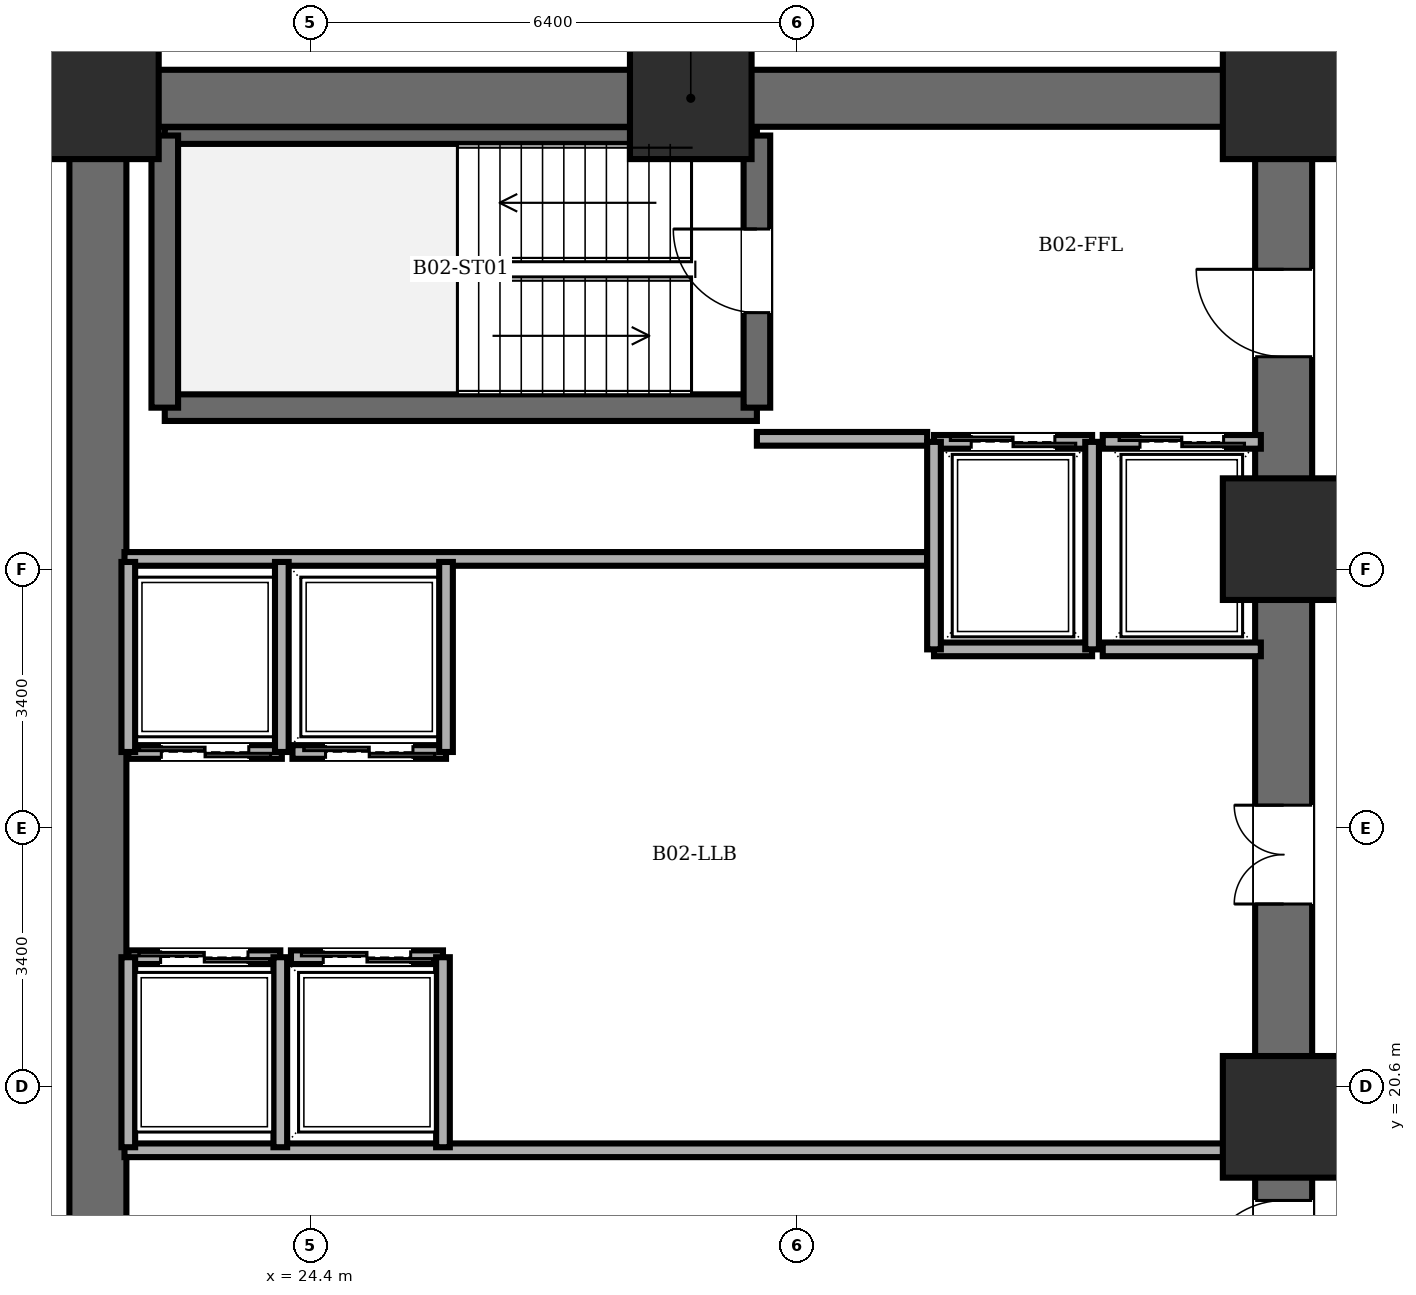
"""IFC4 building model, lengths in metres.
Left out: names, types, materials, properties, quantities, classifications, styles, units other than length and angle.
Written with IfcOpenShell. Run it as: python <this file> out.ifc"""

import sys

from ifc_helpers import new_model, si_unit, direction, frame, frame_2d, origin, origin_2d, place, context, subcontext, project, spatial, rectangle, extrude, element, fill, save


model = new_model("IFC4")
c1 = context("Model", 3, precision=1e-05, world=origin(), true_north=direction((0.0, 1.0)))
c2 = subcontext(c1, "Body", "Model", "MODEL_VIEW")
j1 = project(units=[si_unit("LENGTHUNIT", "METRE"), si_unit("PLANEANGLEUNIT", "RADIAN")], contexts=[c1])
p1 = place(None, origin())
s1 = spatial("IfcSite", under=j1, at=p1, CompositionType="ELEMENT")
p2 = place(p1, origin())
s2 = spatial("IfcBuilding", under=s1, at=p2, CompositionType="ELEMENT")
p3 = place(p2, frame((0.0, 0.0, -8.4)))
s3 = spatial("IfcBuildingStorey", under=s2, at=p3, CompositionType="ELEMENT", Elevation=-8.4)
for number, where, z_axis, x_axis in (
    (1, (37.2, 20.2, 0.0), (0.0, 0.0, 1.0), (1.0, 0.0, 0.0)),
    (2, (37.2, 27.8, 0.0), (0.0, 0.0, 1.0), (1.0, 0.0, 0.0)),
    (3, (37.2, 33.6, 0.0), (0.0, 0.0, 1.0), (1.0, 0.0, 0.0)),
    (4, (29.4, 33.6, 0.0), (0.0, 0.0, 1.0), (1.0, 0.0, 0.0)),
    (5, (21.6, 33.6, 0.0), (0.0, 0.0, 1.0), (1.0, 0.0, 0.0)),
):
    element("IfcColumn", number, at=place(p3, frame(where, z_axis=z_axis, x_axis=x_axis)), inside=s3, PredefinedType="COLUMN", context=c2, shape_type="SweptSolid", body=[
        extrude(rectangle(XDim=1.6, YDim=1.6, at=origin_2d()), origin(), (0.0, 0.0, 1.0), 4.2),
    ])
p4 = place(p3, frame((21.6, 14.4, 0.0), z_axis=(0.0, 0.0, 1.0), x_axis=(0.0, 1.0, 0.0)))
e6 = element("IfcWall", 6, at=p4, inside=s3, PredefinedType="SHEAR", context=c2, shape_type="SweptSolid", body=[
    extrude(rectangle(XDim=19.2, YDim=0.75, at=frame_2d((9.6, 0.0))), origin(), (0.0, 0.0, 1.0), 3.95),
])
p5 = place(p3, frame((21.6, 33.6, 0.0), z_axis=(0.0, 0.0, 1.0), x_axis=(1.0, 0.0, 0.0)))
e7 = element("IfcWall", 7, at=p5, inside=s3, PredefinedType="SHEAR", context=c2, shape_type="SweptSolid", body=[
    extrude(rectangle(XDim=15.6, YDim=0.75, at=frame_2d((7.8, 0.0))), origin(), (0.0, 0.0, 1.0), 3.95),
])
p6 = place(p3, frame((37.2, 14.4, 0.0), z_axis=(0.0, 0.0, 1.0), x_axis=(0.0, 1.0, 0.0)))
e8 = element("IfcWall", 8, at=p6, inside=s3, PredefinedType="SHEAR", context=c2, shape_type="SweptSolid", body=[
    extrude(rectangle(XDim=19.2, YDim=0.75, at=frame_2d((9.6, 0.0))), origin(), (0.0, 0.0, 1.0), 3.95),
])
p7 = place(p6, frame((15.8, 0.0, 0.0)))
e9 = element("IfcOpeningElement", 9, at=p7, cuts=e8, PredefinedType="OPENING", context=c2, shape_type="SweptSolid", body=[
    extrude(rectangle(XDim=1.15, YDim=2.15, at=frame_2d((0.575, 1.075))), frame((0.0, 0.385, 0.0), z_axis=(0.0, -1.0, 0.0), x_axis=(1.0, 0.0, 0.0)), (0.0, 0.0, 1.0), 0.77),
])
p8 = place(p6, frame((3.6, 0.0, 0.0)))
e10 = element("IfcOpeningElement", 10, at=p8, cuts=e8, PredefinedType="OPENING", context=c2, shape_type="SweptSolid", body=[
    extrude(rectangle(XDim=1.1, YDim=2.15, at=frame_2d((0.55, 1.075))), frame((0.0, 0.385, 0.0), z_axis=(0.0, -1.0, 0.0), x_axis=(1.0, 0.0, 0.0)), (0.0, 0.0, 1.0), 0.77),
])
p9 = place(p6, frame((8.6, 0.0, 0.0)))
e11 = element("IfcOpeningElement", 11, at=p9, cuts=e8, PredefinedType="OPENING", context=c2, shape_type="SweptSolid", body=[
    extrude(rectangle(XDim=1.3, YDim=2.2, at=frame_2d((0.65, 1.1))), frame((0.0, 0.385, 0.0), z_axis=(0.0, -1.0, 0.0), x_axis=(1.0, 0.0, 0.0)), (0.0, 0.0, 1.0), 0.77),
])
p10 = place(p3, frame((22.48, 29.53, 0.0), z_axis=(0.0, 0.0, 1.0), x_axis=(1.0, 0.0, 0.0)))
e12 = element("IfcWall", 12, at=p10, inside=s3, PredefinedType="SOLIDWALL", context=c2, shape_type="SweptSolid", body=[
    extrude(rectangle(XDim=7.79, YDim=0.35, at=frame_2d((3.895, 0.0))), origin(), (0.0, 0.0, 1.0), 3.95),
])
p11 = place(p3, frame((22.48, 33.11, 0.0), z_axis=(0.0, 0.0, 1.0), x_axis=(1.0, 0.0, 0.0)))
e13 = element("IfcWall", 13, at=p11, inside=s3, PredefinedType="PARTITIONING", context=c2, shape_type="SweptSolid", body=[
    extrude(rectangle(XDim=7.79, YDim=0.22, at=frame_2d((3.895, 0.0))), origin(), (0.0, 0.0, 1.0), 3.95),
])
p12 = place(p3, frame((22.48, 29.53, 0.0), z_axis=(0.0, 0.0, 1.0), x_axis=(0.0, 1.0, 0.0)))
e14 = element("IfcWall", 14, at=p12, inside=s3, PredefinedType="SOLIDWALL", context=c2, shape_type="SweptSolid", body=[
    extrude(rectangle(XDim=3.58, YDim=0.35, at=frame_2d((1.79, 0.0))), origin(), (0.0, 0.0, 1.0), 3.95),
])
p13 = place(p3, frame((30.27, 29.53, 0.0), z_axis=(0.0, 0.0, 1.0), x_axis=(0.0, 1.0, 0.0)))
e15 = element("IfcWall", 15, at=p13, inside=s3, PredefinedType="SOLIDWALL", context=c2, shape_type="SweptSolid", body=[
    extrude(rectangle(XDim=3.58, YDim=0.35, at=frame_2d((1.79, 0.0))), origin(), (0.0, 0.0, 1.0), 3.95),
])
p14 = place(p13, frame((1.25, 0.0, 0.0)))
e16 = element("IfcOpeningElement", 16, at=p14, cuts=e15, PredefinedType="OPENING", context=c2, shape_type="SweptSolid", body=[
    extrude(rectangle(XDim=1.1, YDim=2.15, at=frame_2d((0.55, 1.075))), frame((0.0, 0.185, 0.0), z_axis=(0.0, -1.0, 0.0), x_axis=(1.0, 0.0, 0.0)), (0.0, 0.0, 1.0), 0.37),
])
p15 = place(p3, frame((30.27, 29.12, 0.0), z_axis=(0.0, 0.0, 1.0), x_axis=(1.0, 0.0, 0.0)))
e17 = element("IfcWall", 17, at=p15, inside=s3, PredefinedType="PARTITIONING", context=c2, shape_type="SweptSolid", body=[
    extrude(rectangle(XDim=2.24, YDim=0.18, at=frame_2d((1.12, 0.0))), origin(), (0.0, 0.0, 1.0), 3.95),
])
p16 = place(p3, frame((21.95, 27.54, 0.0), z_axis=(0.0, 0.0, 1.0), x_axis=(1.0, 0.0, 0.0)))
e18 = element("IfcWall", 18, at=p16, inside=s3, PredefinedType="PARTITIONING", context=c2, shape_type="SweptSolid", body=[
    extrude(rectangle(XDim=10.56, YDim=0.18, at=frame_2d((5.28, 0.0))), origin(), (0.0, 0.0, 1.0), 3.95),
])
p17 = place(p3, frame((21.95, 19.76, 0.0), z_axis=(0.0, 0.0, 1.0), x_axis=(1.0, 0.0, 0.0)))
e19 = element("IfcWall", 19, at=p17, inside=s3, PredefinedType="PARTITIONING", context=c2, shape_type="SweptSolid", body=[
    extrude(rectangle(XDim=14.87, YDim=0.18, at=frame_2d((7.435, 0.0))), origin(), (0.0, 0.0, 1.0), 3.95),
])
p18 = place(p3, frame((32.6, 29.08, 0.0), z_axis=(0.0, 0.0, 1.0), x_axis=(1.0, 0.0, 0.0)))
e20 = element("IfcWall", 20, at=p18, inside=s3, PredefinedType="PARTITIONING", context=c2, shape_type="SweptSolid", body=[
    extrude(rectangle(XDim=2.08, YDim=0.18, at=frame_2d((1.04, 0.0))), origin(), (0.0, 0.0, 1.0), 3.95),
])
p19 = place(p18, frame((0.49, 0.0, 0.0)))
e21 = element("IfcOpeningElement", 21, at=p19, cuts=e20, PredefinedType="OPENING", context=c2, shape_type="SweptSolid", body=[
    extrude(rectangle(XDim=1.1, YDim=2.2, at=frame_2d((0.55, 1.1))), frame((0.0, 0.1, 0.0), z_axis=(0.0, -1.0, 0.0), x_axis=(1.0, 0.0, 0.0)), (0.0, 0.0, 1.0), 0.2),
])
p20 = place(p3, frame((34.68, 26.35, 0.0), z_axis=(0.0, 0.0, 1.0), x_axis=(-1.0, 0.0, 0.0)))
e22 = element("IfcWall", 22, at=p20, inside=s3, PredefinedType="PARTITIONING", context=c2, shape_type="SweptSolid", body=[
    extrude(rectangle(XDim=2.08, YDim=0.18, at=frame_2d((1.04, 0.0))), origin(), (0.0, 0.0, 1.0), 3.95),
])
for number, where, z_axis, x_axis in (
    (23, (34.68, 26.35, 0.0), (0.0, 0.0, 1.0), (0.0, 1.0, 0.0)),
    (24, (32.6, 29.08, 0.0), (0.0, 0.0, 1.0), (0.0, -1.0, 0.0)),
):
    element("IfcWall", number, at=place(p3, frame(where, z_axis=z_axis, x_axis=x_axis)), inside=s3, PredefinedType="PARTITIONING", context=c2, shape_type="SweptSolid", body=[
        extrude(rectangle(XDim=2.73, YDim=0.18, at=frame_2d((1.365, 0.0))), origin(), (0.0, 0.0, 1.0), 3.95),
    ])
p21 = place(p3, frame((34.82, 29.08, 0.0), z_axis=(0.0, 0.0, 1.0), x_axis=(1.0, 0.0, 0.0)))
e25 = element("IfcWall", 25, at=p21, inside=s3, PredefinedType="PARTITIONING", context=c2, shape_type="SweptSolid", body=[
    extrude(rectangle(XDim=2.08, YDim=0.18, at=frame_2d((1.04, 0.0))), origin(), (0.0, 0.0, 1.0), 3.95),
])
p22 = place(p21, frame((0.49, 0.0, 0.0)))
e26 = element("IfcOpeningElement", 26, at=p22, cuts=e25, PredefinedType="OPENING", context=c2, shape_type="SweptSolid", body=[
    extrude(rectangle(XDim=1.1, YDim=2.2, at=frame_2d((0.55, 1.1))), frame((0.0, 0.1, 0.0), z_axis=(0.0, -1.0, 0.0), x_axis=(1.0, 0.0, 0.0)), (0.0, 0.0, 1.0), 0.2),
])
p23 = place(p3, frame((36.9, 26.35, 0.0), z_axis=(0.0, 0.0, 1.0), x_axis=(-1.0, 0.0, 0.0)))
e27 = element("IfcWall", 27, at=p23, inside=s3, PredefinedType="PARTITIONING", context=c2, shape_type="SweptSolid", body=[
    extrude(rectangle(XDim=2.08, YDim=0.18, at=frame_2d((1.04, 0.0))), origin(), (0.0, 0.0, 1.0), 3.95),
])
p24 = place(p3, frame((24.02, 25.0, 0.0), z_axis=(0.0, 0.0, 1.0), x_axis=(-1.0, 0.0, 0.0)))
e28 = element("IfcWall", 28, at=p24, inside=s3, PredefinedType="PARTITIONING", context=c2, shape_type="SweptSolid", body=[
    extrude(rectangle(XDim=2.02, YDim=0.18, at=frame_2d((1.01, 0.0))), origin(), (0.0, 0.0, 1.0), 3.95),
])
p25 = place(p24, frame((0.435, 0.0, 0.0)))
e29 = element("IfcOpeningElement", 29, at=p25, cuts=e28, PredefinedType="OPENING", context=c2, shape_type="SweptSolid", body=[
    extrude(rectangle(XDim=1.15, YDim=2.2, at=frame_2d((0.575, 1.1))), frame((0.0, 0.1, 0.0), z_axis=(0.0, -1.0, 0.0), x_axis=(1.0, 0.0, 0.0)), (0.0, 0.0, 1.0), 0.2),
])
for number, where, z_axis, x_axis in (
    (30, (24.02, 25.0, 0.0), (0.0, 0.0, 1.0), (0.0, 1.0, 0.0)),
    (31, (22.0, 27.5, 0.0), (0.0, 0.0, 1.0), (0.0, -1.0, 0.0)),
):
    element("IfcWall", number, at=place(p3, frame(where, z_axis=z_axis, x_axis=x_axis)), inside=s3, PredefinedType="PARTITIONING", context=c2, shape_type="SweptSolid", body=[
        extrude(rectangle(XDim=2.5, YDim=0.18, at=frame_2d((1.25, 0.0))), origin(), (0.0, 0.0, 1.0), 3.95),
    ])
p26 = place(p3, frame((26.18, 25.0, 0.0), z_axis=(0.0, 0.0, 1.0), x_axis=(-1.0, 0.0, 0.0)))
e32 = element("IfcWall", 32, at=p26, inside=s3, PredefinedType="PARTITIONING", context=c2, shape_type="SweptSolid", body=[
    extrude(rectangle(XDim=2.02, YDim=0.18, at=frame_2d((1.01, 0.0))), origin(), (0.0, 0.0, 1.0), 3.95),
])
p27 = place(p26, frame((0.435, 0.0, 0.0)))
e33 = element("IfcOpeningElement", 33, at=p27, cuts=e32, PredefinedType="OPENING", context=c2, shape_type="SweptSolid", body=[
    extrude(rectangle(XDim=1.15, YDim=2.2, at=frame_2d((0.575, 1.1))), frame((0.0, 0.1, 0.0), z_axis=(0.0, -1.0, 0.0), x_axis=(1.0, 0.0, 0.0)), (0.0, 0.0, 1.0), 0.2),
])
p28 = place(p3, frame((26.18, 25.0, 0.0), z_axis=(0.0, 0.0, 1.0), x_axis=(0.0, 1.0, 0.0)))
e34 = element("IfcWall", 34, at=p28, inside=s3, PredefinedType="PARTITIONING", context=c2, shape_type="SweptSolid", body=[
    extrude(rectangle(XDim=2.5, YDim=0.18, at=frame_2d((1.25, 0.0))), origin(), (0.0, 0.0, 1.0), 3.95),
])
p29 = place(p3, frame((22.0, 22.3, 0.0), z_axis=(0.0, 0.0, 1.0), x_axis=(1.0, 0.0, 0.0)))
e35 = element("IfcWall", 35, at=p29, inside=s3, PredefinedType="PARTITIONING", context=c2, shape_type="SweptSolid", body=[
    extrude(rectangle(XDim=2.0, YDim=0.18, at=frame_2d((1.0, 0.0))), origin(), (0.0, 0.0, 1.0), 3.95),
])
p30 = place(p29, frame((0.425, 0.0, 0.0)))
e36 = element("IfcOpeningElement", 36, at=p30, cuts=e35, PredefinedType="OPENING", context=c2, shape_type="SweptSolid", body=[
    extrude(rectangle(XDim=1.15, YDim=2.2, at=frame_2d((0.575, 1.1))), frame((0.0, 0.1, 0.0), z_axis=(0.0, -1.0, 0.0), x_axis=(1.0, 0.0, 0.0)), (0.0, 0.0, 1.0), 0.2),
])
for number, where, z_axis, x_axis in (
    (37, (24.0, 19.8, 0.0), (0.0, 0.0, 1.0), (0.0, 1.0, 0.0)),
    (38, (22.0, 22.3, 0.0), (0.0, 0.0, 1.0), (0.0, -1.0, 0.0)),
):
    element("IfcWall", number, at=place(p3, frame(where, z_axis=z_axis, x_axis=x_axis)), inside=s3, PredefinedType="PARTITIONING", context=c2, shape_type="SweptSolid", body=[
        extrude(rectangle(XDim=2.5, YDim=0.18, at=frame_2d((1.25, 0.0))), origin(), (0.0, 0.0, 1.0), 3.95),
    ])
p31 = place(p3, frame((24.14, 22.3, 0.0), z_axis=(0.0, 0.0, 1.0), x_axis=(1.0, 0.0, 0.0)))
e39 = element("IfcWall", 39, at=p31, inside=s3, PredefinedType="PARTITIONING", context=c2, shape_type="SweptSolid", body=[
    extrude(rectangle(XDim=2.0, YDim=0.18, at=frame_2d((1.0, 0.0))), origin(), (0.0, 0.0, 1.0), 3.95),
])
p32 = place(p31, frame((0.425, 0.0, 0.0)))
e40 = element("IfcOpeningElement", 40, at=p32, cuts=e39, PredefinedType="OPENING", context=c2, shape_type="SweptSolid", body=[
    extrude(rectangle(XDim=1.15, YDim=2.2, at=frame_2d((0.575, 1.1))), frame((0.0, 0.1, 0.0), z_axis=(0.0, -1.0, 0.0), x_axis=(1.0, 0.0, 0.0)), (0.0, 0.0, 1.0), 0.2),
])
p33 = place(p3, frame((26.14, 19.8, 0.0), z_axis=(0.0, 0.0, 1.0), x_axis=(0.0, 1.0, 0.0)))
e41 = element("IfcWall", 41, at=p33, inside=s3, PredefinedType="PARTITIONING", context=c2, shape_type="SweptSolid", body=[
    extrude(rectangle(XDim=2.5, YDim=0.18, at=frame_2d((1.25, 0.0))), origin(), (0.0, 0.0, 1.0), 3.95),
])
p34 = place(p14, origin())
e42 = element("IfcDoor", 42, at=p34, inside=s3, OperationType="SINGLE_SWING_RIGHT", PredefinedType="DOOR", context=c2, shape_type="SweptSolid", body=[
    extrude(rectangle(XDim=1.1, YDim=2.15, at=frame_2d((0.55, 1.075))), frame((0.0, 0.025, 0.0), z_axis=(0.0, -1.0, 0.0), x_axis=(1.0, 0.0, 0.0)), (0.0, 0.0, 1.0), 0.05),
])
fill(e16, e42)
p35 = place(p7, origin())
e43 = element("IfcDoor", 43, at=p35, inside=s3, OperationType="SINGLE_SWING_RIGHT", PredefinedType="DOOR", context=c2, shape_type="SweptSolid", body=[
    extrude(rectangle(XDim=1.15, YDim=2.15, at=frame_2d((0.575, 1.075))), frame((0.0, 0.025, 0.0), z_axis=(0.0, -1.0, 0.0), x_axis=(1.0, 0.0, 0.0)), (0.0, 0.0, 1.0), 0.05),
])
fill(e9, e43)
p36 = place(p8, origin())
e44 = element("IfcDoor", 44, at=p36, inside=s3, OperationType="SINGLE_SWING_LEFT", PredefinedType="DOOR", context=c2, shape_type="SweptSolid", body=[
    extrude(rectangle(XDim=1.1, YDim=2.15, at=frame_2d((0.55, 1.075))), frame((0.0, 0.025, 0.0), z_axis=(0.0, -1.0, 0.0), x_axis=(1.0, 0.0, 0.0)), (0.0, 0.0, 1.0), 0.05),
])
fill(e10, e44)
p37 = place(p19, origin())
e45 = element("IfcDoor", 45, at=p37, inside=s3, OperationType="DOUBLE_DOOR_SLIDING", PredefinedType="DOOR", context=c2, shape_type="SweptSolid", body=[
    extrude(rectangle(XDim=1.1, YDim=2.2, at=frame_2d((0.55, 1.1))), frame((0.0, 0.025, 0.0), z_axis=(0.0, -1.0, 0.0), x_axis=(1.0, 0.0, 0.0)), (0.0, 0.0, 1.0), 0.05),
])
fill(e21, e45)
p38 = place(p22, origin())
e46 = element("IfcDoor", 46, at=p38, inside=s3, OperationType="DOUBLE_DOOR_SLIDING", PredefinedType="DOOR", context=c2, shape_type="SweptSolid", body=[
    extrude(rectangle(XDim=1.1, YDim=2.2, at=frame_2d((0.55, 1.1))), frame((0.0, 0.025, 0.0), z_axis=(0.0, -1.0, 0.0), x_axis=(1.0, 0.0, 0.0)), (0.0, 0.0, 1.0), 0.05),
])
fill(e26, e46)
p39 = place(p25, origin())
e47 = element("IfcDoor", 47, at=p39, inside=s3, OperationType="DOUBLE_DOOR_SLIDING", PredefinedType="DOOR", context=c2, shape_type="SweptSolid", body=[
    extrude(rectangle(XDim=1.15, YDim=2.2, at=frame_2d((0.575, 1.1))), frame((0.0, 0.025, 0.0), z_axis=(0.0, -1.0, 0.0), x_axis=(1.0, 0.0, 0.0)), (0.0, 0.0, 1.0), 0.05),
])
fill(e29, e47)
p40 = place(p27, origin())
e48 = element("IfcDoor", 48, at=p40, inside=s3, OperationType="DOUBLE_DOOR_SLIDING", PredefinedType="DOOR", context=c2, shape_type="SweptSolid", body=[
    extrude(rectangle(XDim=1.15, YDim=2.2, at=frame_2d((0.575, 1.1))), frame((0.0, 0.025, 0.0), z_axis=(0.0, -1.0, 0.0), x_axis=(1.0, 0.0, 0.0)), (0.0, 0.0, 1.0), 0.05),
])
fill(e33, e48)
p41 = place(p30, origin())
e49 = element("IfcDoor", 49, at=p41, inside=s3, OperationType="DOUBLE_DOOR_SLIDING", PredefinedType="DOOR", context=c2, shape_type="SweptSolid", body=[
    extrude(rectangle(XDim=1.15, YDim=2.2, at=frame_2d((0.575, 1.1))), frame((0.0, 0.025, 0.0), z_axis=(0.0, -1.0, 0.0), x_axis=(1.0, 0.0, 0.0)), (0.0, 0.0, 1.0), 0.05),
])
fill(e36, e49)
p42 = place(p32, origin())
e50 = element("IfcDoor", 50, at=p42, inside=s3, OperationType="DOUBLE_DOOR_SLIDING", PredefinedType="DOOR", context=c2, shape_type="SweptSolid", body=[
    extrude(rectangle(XDim=1.15, YDim=2.2, at=frame_2d((0.575, 1.1))), frame((0.0, 0.025, 0.0), z_axis=(0.0, -1.0, 0.0), x_axis=(1.0, 0.0, 0.0)), (0.0, 0.0, 1.0), 0.05),
])
fill(e40, e50)
p43 = place(p9, origin())
e51 = element("IfcDoor", 51, at=p43, inside=s3, OperationType="DOUBLE_DOOR_SINGLE_SWING", PredefinedType="DOOR", context=c2, shape_type="SweptSolid", body=[
    extrude(rectangle(XDim=1.3, YDim=2.2, at=frame_2d((0.65, 1.1))), frame((0.0, 0.025, 0.0), z_axis=(0.0, -1.0, 0.0), x_axis=(1.0, 0.0, 0.0)), (0.0, 0.0, 1.0), 0.05),
])
fill(e11, e51)
save(model, sys.argv[1])
